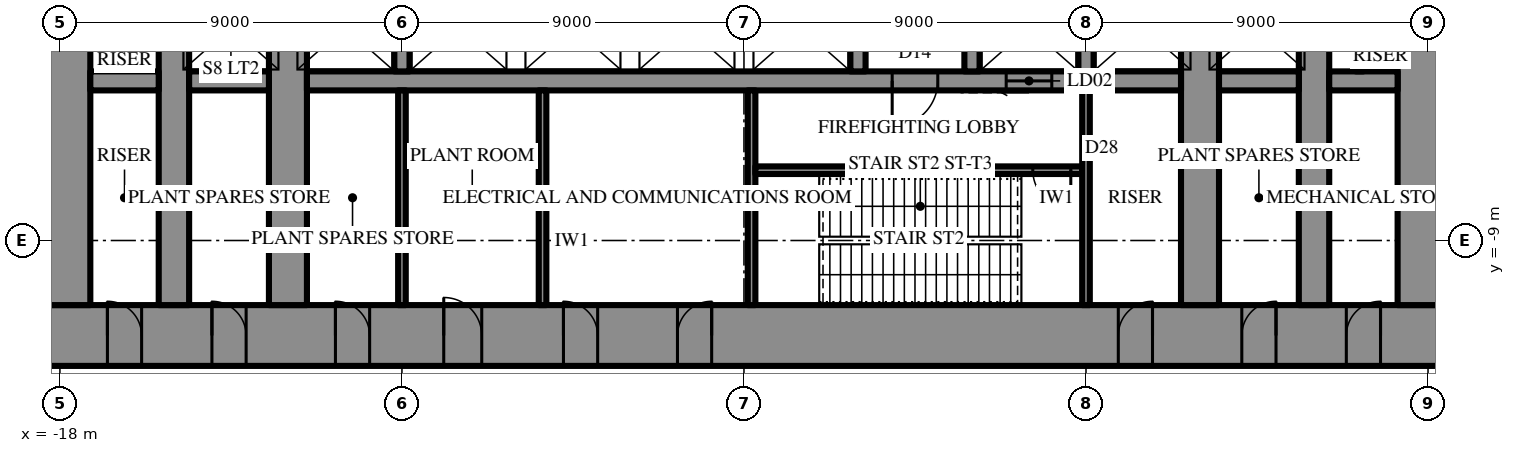
"""IFC4 building model, lengths in metres.
Left out: names, types, materials, properties, quantities, classifications, styles, units other than length and angle.
Written with IfcOpenShell. Run it as: python <this file> out.ifc"""

import sys

from ifc_helpers import new_model, si_unit, direction, frame, frame_2d, origin, place, context, subcontext, project, spatial, rectangle, extrude, element, fill, save


model = new_model("IFC4")
c1 = context("Model", 3, precision=1e-05, world=origin(), true_north=direction((0.0, 1.0)))
c2 = subcontext(c1, "Body", "Model", "MODEL_VIEW")
j1 = project(units=[si_unit("LENGTHUNIT", "METRE"), si_unit("PLANEANGLEUNIT", "RADIAN")], contexts=[c1])
p1 = place(None, origin())
s1 = spatial("IfcSite", under=j1, at=p1, CompositionType="ELEMENT")
p2 = place(p1, origin())
s2 = spatial("IfcBuilding", under=s1, at=p2, CompositionType="ELEMENT")
p3 = place(p2, frame((0.0, 0.0, 203.5)))
s3 = spatial("IfcBuildingStorey", under=s2, at=p3, CompositionType="ELEMENT", Elevation=203.5)
p4 = place(p3, frame((18.6, -11.5, 0.0), z_axis=(0.0, 0.0, 1.0), x_axis=(-1.0, 0.0, 0.0)))
e1 = element("IfcWall", 1, at=p4, inside=s3, PredefinedType="SHEAR", context=c2, shape_type="SweptSolid", body=[
    extrude(rectangle(XDim=37.2, YDim=1.6, at=frame_2d((18.6, 0.0))), origin(), (0.0, 0.0, 1.0), 7.0),
])
p5 = place(p4, frame((19.45, 0.0, 0.0)))
e2 = element("IfcOpeningElement", 2, at=p5, cuts=e1, PredefinedType="OPENING", context=c2, shape_type="SweptSolid", body=[
    extrude(rectangle(XDim=0.9, YDim=2.2, at=frame_2d((0.45, 1.1))), frame((0.0, 0.81, 0.0), z_axis=(0.0, -1.0, 0.0), x_axis=(1.0, 0.0, 0.0)), (0.0, 0.0, 1.0), 1.62),
])
p6 = place(p4, frame((22.45, 0.0, 0.0)))
e3 = element("IfcOpeningElement", 3, at=p6, cuts=e1, PredefinedType="OPENING", context=c2, shape_type="SweptSolid", body=[
    extrude(rectangle(XDim=0.9, YDim=2.2, at=frame_2d((0.45, 1.1))), frame((0.0, 0.81, 0.0), z_axis=(0.0, -1.0, 0.0), x_axis=(1.0, 0.0, 0.0)), (0.0, 0.0, 1.0), 1.62),
])
p7 = place(p4, frame((25.5, 0.0, 0.0)))
e4 = element("IfcOpeningElement", 4, at=p7, cuts=e1, PredefinedType="OPENING", context=c2, shape_type="SweptSolid", body=[
    extrude(rectangle(XDim=1.0, YDim=2.2, at=frame_2d((0.5, 1.1))), frame((0.0, 0.81, 0.0), z_axis=(0.0, -1.0, 0.0), x_axis=(1.0, 0.0, 0.0)), (0.0, 0.0, 1.0), 1.62),
])
p8 = place(p4, frame((1.85, 0.0, 0.0)))
e5 = element("IfcOpeningElement", 5, at=p8, cuts=e1, PredefinedType="OPENING", context=c2, shape_type="SweptSolid", body=[
    extrude(rectangle(XDim=0.9, YDim=2.2, at=frame_2d((0.45, 1.1))), frame((0.0, 0.81, 0.0), z_axis=(0.0, -1.0, 0.0), x_axis=(1.0, 0.0, 0.0)), (0.0, 0.0, 1.0), 1.62),
])
p9 = place(p4, frame((4.6, 0.0, 0.0)))
e6 = element("IfcOpeningElement", 6, at=p9, cuts=e1, PredefinedType="OPENING", context=c2, shape_type="SweptSolid", body=[
    extrude(rectangle(XDim=0.9, YDim=2.2, at=frame_2d((0.45, 1.1))), frame((0.0, 0.81, 0.0), z_axis=(0.0, -1.0, 0.0), x_axis=(1.0, 0.0, 0.0)), (0.0, 0.0, 1.0), 1.62),
])
p10 = place(p4, frame((7.85, 0.0, 0.0)))
e7 = element("IfcOpeningElement", 7, at=p10, cuts=e1, PredefinedType="OPENING", context=c2, shape_type="SweptSolid", body=[
    extrude(rectangle(XDim=0.9, YDim=2.2, at=frame_2d((0.45, 1.1))), frame((0.0, 0.81, 0.0), z_axis=(0.0, -1.0, 0.0), x_axis=(1.0, 0.0, 0.0)), (0.0, 0.0, 1.0), 1.62),
])
p11 = place(p4, frame((28.45, 0.0, 0.0)))
e8 = element("IfcOpeningElement", 8, at=p11, cuts=e1, PredefinedType="OPENING", context=c2, shape_type="SweptSolid", body=[
    extrude(rectangle(XDim=0.9, YDim=2.2, at=frame_2d((0.45, 1.1))), frame((0.0, 0.81, 0.0), z_axis=(0.0, -1.0, 0.0), x_axis=(1.0, 0.0, 0.0)), (0.0, 0.0, 1.0), 1.62),
])
p12 = place(p4, frame((31.7, 0.0, 0.0)))
e9 = element("IfcOpeningElement", 9, at=p12, cuts=e1, PredefinedType="OPENING", context=c2, shape_type="SweptSolid", body=[
    extrude(rectangle(XDim=0.9, YDim=2.2, at=frame_2d((0.45, 1.1))), frame((0.0, 0.81, 0.0), z_axis=(0.0, -1.0, 0.0), x_axis=(1.0, 0.0, 0.0)), (0.0, 0.0, 1.0), 1.62),
])
p13 = place(p4, frame((34.45, 0.0, 0.0)))
e10 = element("IfcOpeningElement", 10, at=p13, cuts=e1, PredefinedType="OPENING", context=c2, shape_type="SweptSolid", body=[
    extrude(rectangle(XDim=0.9, YDim=2.2, at=frame_2d((0.45, 1.1))), frame((0.0, 0.81, 0.0), z_axis=(0.0, -1.0, 0.0), x_axis=(1.0, 0.0, 0.0)), (0.0, 0.0, 1.0), 1.62),
])
p14 = place(p3, frame((17.9, -10.7, 0.0), z_axis=(0.0, 0.0, 1.0), x_axis=(0.0, 1.0, 0.0)))
e11 = element("IfcWall", 11, at=p14, inside=s3, PredefinedType="SHEAR", context=c2, shape_type="SweptSolid", body=[
    extrude(rectangle(XDim=21.4, YDim=1.4, at=frame_2d((10.7, 0.0))), origin(), (0.0, 0.0, 1.0), 7.0),
])
p15 = place(p14, frame((9.8, 0.0, 0.0)))
e12 = element("IfcOpeningElement", 12, at=p15, cuts=e11, PredefinedType="OPENING", context=c2, shape_type="SweptSolid", body=[
    extrude(rectangle(XDim=1.8, YDim=2.4, at=frame_2d((0.9, 1.2))), frame((0.0, 0.71, 0.0), z_axis=(0.0, -1.0, 0.0), x_axis=(1.0, 0.0, 0.0)), (0.0, 0.0, 1.0), 1.42),
])
p16 = place(p3, frame((-17.9, 10.7, 0.0), z_axis=(0.0, 0.0, 1.0), x_axis=(0.0, -1.0, 0.0)))
e13 = element("IfcWall", 13, at=p16, inside=s3, PredefinedType="SHEAR", context=c2, shape_type="SweptSolid", body=[
    extrude(rectangle(XDim=21.4, YDim=1.4, at=frame_2d((10.7, 0.0))), origin(), (0.0, 0.0, 1.0), 7.0),
])
p17 = place(p16, frame((9.8, 0.0, 0.0)))
e14 = element("IfcOpeningElement", 14, at=p17, cuts=e13, PredefinedType="OPENING", context=c2, shape_type="SweptSolid", body=[
    extrude(rectangle(XDim=1.8, YDim=2.4, at=frame_2d((0.9, 1.2))), frame((0.0, 0.71, 0.0), z_axis=(0.0, -1.0, 0.0), x_axis=(1.0, 0.0, 0.0)), (0.0, 0.0, 1.0), 1.42),
])
p18 = place(p3, frame((12.0, -10.7, 0.0), z_axis=(0.0, 0.0, 1.0), x_axis=(0.0, 1.0, 0.0)))
e15 = element("IfcWall", 15, at=p18, inside=s3, PredefinedType="SHEAR", context=c2, shape_type="SweptSolid", body=[
    extrude(rectangle(XDim=21.4, YDim=1.0, at=frame_2d((10.7, 0.0))), origin(), (0.0, 0.0, 1.0), 7.0),
])
p19 = place(p18, frame((9.8, 0.0, 0.0)))
e16 = element("IfcOpeningElement", 16, at=p19, cuts=e15, PredefinedType="OPENING", context=c2, shape_type="SweptSolid", body=[
    extrude(rectangle(XDim=1.8, YDim=2.4, at=frame_2d((0.9, 1.2))), frame((0.0, 0.51, 0.0), z_axis=(0.0, -1.0, 0.0), x_axis=(1.0, 0.0, 0.0)), (0.0, 0.0, 1.0), 1.02),
])
p20 = place(p3, frame((-12.0, -10.7, 0.0), z_axis=(0.0, 0.0, 1.0), x_axis=(0.0, 1.0, 0.0)))
e17 = element("IfcWall", 17, at=p20, inside=s3, PredefinedType="SHEAR", context=c2, shape_type="SweptSolid", body=[
    extrude(rectangle(XDim=21.4, YDim=1.0, at=frame_2d((10.7, 0.0))), origin(), (0.0, 0.0, 1.0), 7.0),
])
p21 = place(p20, frame((9.8, 0.0, 0.0)))
e18 = element("IfcOpeningElement", 18, at=p21, cuts=e17, PredefinedType="OPENING", context=c2, shape_type="SweptSolid", body=[
    extrude(rectangle(XDim=1.8, YDim=2.4, at=frame_2d((0.9, 1.2))), frame((0.0, 0.51, 0.0), z_axis=(0.0, -1.0, 0.0), x_axis=(1.0, 0.0, 0.0)), (0.0, 0.0, 1.0), 1.02),
])
p22 = place(p3, frame((15.0, -10.7, 0.0), z_axis=(0.0, 0.0, 1.0), x_axis=(0.0, 1.0, 0.0)))
e19 = element("IfcWall", 19, at=p22, inside=s3, PredefinedType="SHEAR", context=c2, shape_type="SweptSolid", body=[
    extrude(rectangle(XDim=21.4, YDim=0.8, at=frame_2d((10.7, 0.0))), origin(), (0.0, 0.0, 1.0), 7.0),
])
p23 = place(p22, frame((9.8, 0.0, 0.0)))
e20 = element("IfcOpeningElement", 20, at=p23, cuts=e19, PredefinedType="OPENING", context=c2, shape_type="SweptSolid", body=[
    extrude(rectangle(XDim=1.8, YDim=2.4, at=frame_2d((0.9, 1.2))), frame((0.0, 0.41, 0.0), z_axis=(0.0, -1.0, 0.0), x_axis=(1.0, 0.0, 0.0)), (0.0, 0.0, 1.0), 0.82),
])
p24 = place(p3, frame((-15.0, -10.7, 0.0), z_axis=(0.0, 0.0, 1.0), x_axis=(0.0, 1.0, 0.0)))
e21 = element("IfcWall", 21, at=p24, inside=s3, PredefinedType="SHEAR", context=c2, shape_type="SweptSolid", body=[
    extrude(rectangle(XDim=21.4, YDim=0.8, at=frame_2d((10.7, 0.0))), origin(), (0.0, 0.0, 1.0), 7.0),
])
p25 = place(p24, frame((9.8, 0.0, 0.0)))
e22 = element("IfcOpeningElement", 22, at=p25, cuts=e21, PredefinedType="OPENING", context=c2, shape_type="SweptSolid", body=[
    extrude(rectangle(XDim=1.8, YDim=2.4, at=frame_2d((0.9, 1.2))), frame((0.0, 0.41, 0.0), z_axis=(0.0, -1.0, 0.0), x_axis=(1.0, 0.0, 0.0)), (0.0, 0.0, 1.0), 0.82),
])
p26 = place(p3, frame((17.2, -4.8, 0.0), z_axis=(0.0, 0.0, 1.0), x_axis=(-1.0, 0.0, 0.0)))
e23 = element("IfcWall", 23, at=p26, inside=s3, PredefinedType="SHEAR", context=c2, shape_type="SweptSolid", body=[
    extrude(rectangle(XDim=1.8, YDim=0.5, at=frame_2d((0.9, 0.0))), origin(), (0.0, 0.0, 1.0), 7.0),
])
p27 = place(p3, frame((14.6, -4.8, 0.0), z_axis=(0.0, 0.0, 1.0), x_axis=(-1.0, 0.0, 0.0)))
e24 = element("IfcWall", 24, at=p27, inside=s3, PredefinedType="SHEAR", context=c2, shape_type="SweptSolid", body=[
    extrude(rectangle(XDim=2.1, YDim=0.5, at=frame_2d((1.05, 0.0))), origin(), (0.0, 0.0, 1.0), 7.0),
])
p28 = place(p3, frame((11.5, -4.8, 0.0), z_axis=(0.0, 0.0, 1.0), x_axis=(-1.0, 0.0, 0.0)))
e25 = element("IfcWall", 25, at=p28, inside=s3, PredefinedType="SHEAR", context=c2, shape_type="SweptSolid", body=[
    extrude(rectangle(XDim=23.0, YDim=0.5, at=frame_2d((11.5, 0.0))), origin(), (0.0, 0.0, 1.0), 7.0),
])
p29 = place(p28, frame((6.4, 0.0, 0.0)))
e26 = element("IfcOpeningElement", 26, at=p29, cuts=e25, PredefinedType="OPENING", context=c2, shape_type="SweptSolid", body=[
    extrude(rectangle(XDim=1.2, YDim=2.2, at=frame_2d((0.6, 1.1))), frame((0.0, 0.26, 0.0), z_axis=(0.0, -1.0, 0.0), x_axis=(1.0, 0.0, 0.0)), (0.0, 0.0, 1.0), 0.52),
])
p30 = place(p28, frame((3.4, 0.0, 0.0)))
e27 = element("IfcOpeningElement", 27, at=p30, cuts=e25, PredefinedType="OPENING", context=c2, shape_type="SweptSolid", body=[
    extrude(rectangle(XDim=1.2, YDim=2.2, at=frame_2d((0.6, 1.1))), frame((0.0, 0.26, 0.0), z_axis=(0.0, -1.0, 0.0), x_axis=(1.0, 0.0, 0.0)), (0.0, 0.0, 1.0), 0.52),
])
p31 = place(p3, frame((-12.5, -4.8, 0.0), z_axis=(0.0, 0.0, 1.0), x_axis=(-1.0, 0.0, 0.0)))
e28 = element("IfcWall", 28, at=p31, inside=s3, PredefinedType="SHEAR", context=c2, shape_type="SweptSolid", body=[
    extrude(rectangle(XDim=2.1, YDim=0.5, at=frame_2d((1.05, 0.0))), origin(), (0.0, 0.0, 1.0), 7.0),
])
p32 = place(p3, frame((-15.4, -4.8, 0.0), z_axis=(0.0, 0.0, 1.0), x_axis=(-1.0, 0.0, 0.0)))
e29 = element("IfcWall", 29, at=p32, inside=s3, PredefinedType="SHEAR", context=c2, shape_type="SweptSolid", body=[
    extrude(rectangle(XDim=1.8, YDim=0.5, at=frame_2d((0.9, 0.0))), origin(), (0.0, 0.0, 1.0), 7.0),
])
for number, where, z_axis, x_axis in (
    (30, (9.0, -2.25, 0.0), (0.0, 0.0, 1.0), (0.0, -1.0, 0.0)),
    (31, (6.0, -2.25, 0.0), (0.0, 0.0, 1.0), (0.0, -1.0, 0.0)),
    (32, (3.0, -2.25, 0.0), (0.0, 0.0, 1.0), (0.0, -1.0, 0.0)),
    (33, (-9.0, -2.25, 0.0), (0.0, 0.0, 1.0), (0.0, -1.0, 0.0)),
):
    element("IfcWall", number, at=place(p3, frame(where, z_axis=z_axis, x_axis=x_axis)), inside=s3, PredefinedType="SHEAR", context=c2, shape_type="SweptSolid", body=[
        extrude(rectangle(XDim=2.3, YDim=0.4, at=frame_2d((1.15, 0.0))), origin(), (0.0, 0.0, 1.0), 7.0),
    ])
p33 = place(p3, frame((0.2, -5.05, 0.0), z_axis=(0.0, 0.0, 1.0), x_axis=(0.0, -1.0, 0.0)))
e34 = element("IfcWall", 34, at=p33, inside=s3, PredefinedType="SHEAR", context=c2, shape_type="SweptSolid", body=[
    extrude(rectangle(XDim=5.65, YDim=0.2, at=frame_2d((2.825, 0.0))), origin(), (0.0, 0.0, 1.0), 7.0),
])
p34 = place(p3, frame((8.9, -7.15, 0.0), z_axis=(0.0, 0.0, 1.0), x_axis=(-1.0, 0.0, 0.0)))
e35 = element("IfcWall", 35, at=p34, inside=s3, PredefinedType="SHEAR", context=c2, shape_type="SweptSolid", body=[
    extrude(rectangle(XDim=8.6, YDim=0.2, at=frame_2d((4.3, 0.0))), origin(), (0.0, 0.0, 1.0), 7.0),
])
p35 = place(p34, frame((0.3, 0.0, 0.0)))
e36 = element("IfcOpeningElement", 36, at=p35, cuts=e35, PredefinedType="OPENING", context=c2, shape_type="SweptSolid", body=[
    extrude(rectangle(XDim=1.0, YDim=2.2, at=frame_2d((0.5, 1.1))), frame((0.0, 0.11, 0.0), z_axis=(0.0, -1.0, 0.0), x_axis=(1.0, 0.0, 0.0)), (0.0, 0.0, 1.0), 0.22),
])
for number, where, z_axis, x_axis in (
    (37, (9.0, -5.05, 0.0), (0.0, 0.0, 1.0), (0.0, -1.0, 0.0)),
    (38, (-9.0, -5.05, 0.0), (0.0, 0.0, 1.0), (0.0, -1.0, 0.0)),
    (39, (-5.3, -5.05, 0.0), (0.0, 0.0, 1.0), (0.0, -1.0, 0.0)),
):
    element("IfcWall", number, at=place(p3, frame(where, z_axis=z_axis, x_axis=x_axis)), inside=s3, PredefinedType="PARTITIONING", context=c2, shape_type="SweptSolid", body=[
        extrude(rectangle(XDim=5.65, YDim=0.2, at=frame_2d((2.825, 0.0))), origin(), (0.0, 0.0, 1.0), 6.7),
    ])
p36 = place(p3, frame((16.2, -3.55, 0.0), z_axis=(0.0, 0.0, 1.0), x_axis=(0.0, -1.0, 0.0)))
e40 = element("IfcWall", 40, at=p36, inside=s3, PredefinedType="PARTITIONING", context=c2, shape_type="SweptSolid", body=[
    extrude(rectangle(XDim=1.0, YDim=0.2, at=frame_2d((0.5, 0.0))), origin(), (0.0, 0.0, 1.0), 6.7),
])
p37 = place(p29, origin())
e41 = element("IfcDoor", 41, at=p37, inside=s3, OperationType="SINGLE_SWING_LEFT", PredefinedType="DOOR", context=c2, shape_type="SweptSolid", body=[
    extrude(rectangle(XDim=1.2, YDim=2.2, at=frame_2d((0.6, 1.1))), frame((0.0, 0.025, 0.0), z_axis=(0.0, -1.0, 0.0), x_axis=(1.0, 0.0, 0.0)), (0.0, 0.0, 1.0), 0.05),
])
fill(e26, e41)
p38 = place(p35, origin())
e42 = element("IfcDoor", 42, at=p38, inside=s3, OperationType="SINGLE_SWING_RIGHT", PredefinedType="DOOR", context=c2, shape_type="SweptSolid", body=[
    extrude(rectangle(XDim=1.0, YDim=2.2, at=frame_2d((0.5, 1.1))), frame((0.0, 0.025, 0.0), z_axis=(0.0, -1.0, 0.0), x_axis=(1.0, 0.0, 0.0)), (0.0, 0.0, 1.0), 0.05),
])
fill(e36, e42)
p39 = place(p5, frame((0.9, 0.0, 0.0), z_axis=(0.0, 0.0, 1.0), x_axis=(-1.0, 0.0, 0.0)))
e43 = element("IfcDoor", 43, at=p39, inside=s3, OperationType="SINGLE_SWING_LEFT", PredefinedType="DOOR", context=c2, shape_type="SweptSolid", body=[
    extrude(rectangle(XDim=0.9, YDim=2.2, at=frame_2d((0.45, 1.1))), frame((0.0, 0.025, 0.0), z_axis=(0.0, -1.0, 0.0), x_axis=(1.0, 0.0, 0.0)), (0.0, 0.0, 1.0), 0.05),
])
fill(e2, e43)
p40 = place(p6, frame((0.9, 0.0, 0.0), z_axis=(0.0, 0.0, 1.0), x_axis=(-1.0, 0.0, 0.0)))
e44 = element("IfcDoor", 44, at=p40, inside=s3, OperationType="SINGLE_SWING_RIGHT", PredefinedType="DOOR", context=c2, shape_type="SweptSolid", body=[
    extrude(rectangle(XDim=0.9, YDim=2.2, at=frame_2d((0.45, 1.1))), frame((0.0, 0.025, 0.0), z_axis=(0.0, -1.0, 0.0), x_axis=(1.0, 0.0, 0.0)), (0.0, 0.0, 1.0), 0.05),
])
fill(e3, e44)
p41 = place(p7, frame((1.0, 0.0, 0.0), z_axis=(0.0, 0.0, 1.0), x_axis=(-1.0, 0.0, 0.0)))
e45 = element("IfcDoor", 45, at=p41, inside=s3, OperationType="SINGLE_SWING_RIGHT", PredefinedType="DOOR", context=c2, shape_type="SweptSolid", body=[
    extrude(rectangle(XDim=1.0, YDim=2.2, at=frame_2d((0.5, 1.1))), frame((0.0, 0.025, 0.0), z_axis=(0.0, -1.0, 0.0), x_axis=(1.0, 0.0, 0.0)), (0.0, 0.0, 1.0), 0.05),
])
fill(e4, e45)
p42 = place(p8, frame((0.9, 0.0, 0.0), z_axis=(0.0, 0.0, 1.0), x_axis=(-1.0, 0.0, 0.0)))
e46 = element("IfcDoor", 46, at=p42, inside=s3, OperationType="SINGLE_SWING_LEFT", PredefinedType="DOOR", context=c2, shape_type="SweptSolid", body=[
    extrude(rectangle(XDim=0.9, YDim=2.2, at=frame_2d((0.45, 1.1))), frame((0.0, 0.025, 0.0), z_axis=(0.0, -1.0, 0.0), x_axis=(1.0, 0.0, 0.0)), (0.0, 0.0, 1.0), 0.05),
])
fill(e5, e46)
p43 = place(p9, frame((0.9, 0.0, 0.0), z_axis=(0.0, 0.0, 1.0), x_axis=(-1.0, 0.0, 0.0)))
e47 = element("IfcDoor", 47, at=p43, inside=s3, OperationType="SINGLE_SWING_LEFT", PredefinedType="DOOR", context=c2, shape_type="SweptSolid", body=[
    extrude(rectangle(XDim=0.9, YDim=2.2, at=frame_2d((0.45, 1.1))), frame((0.0, 0.025, 0.0), z_axis=(0.0, -1.0, 0.0), x_axis=(1.0, 0.0, 0.0)), (0.0, 0.0, 1.0), 0.05),
])
fill(e6, e47)
p44 = place(p10, frame((0.9, 0.0, 0.0), z_axis=(0.0, 0.0, 1.0), x_axis=(-1.0, 0.0, 0.0)))
e48 = element("IfcDoor", 48, at=p44, inside=s3, OperationType="SINGLE_SWING_LEFT", PredefinedType="DOOR", context=c2, shape_type="SweptSolid", body=[
    extrude(rectangle(XDim=0.9, YDim=2.2, at=frame_2d((0.45, 1.1))), frame((0.0, 0.025, 0.0), z_axis=(0.0, -1.0, 0.0), x_axis=(1.0, 0.0, 0.0)), (0.0, 0.0, 1.0), 0.05),
])
fill(e7, e48)
p45 = place(p11, frame((0.9, 0.0, 0.0), z_axis=(0.0, 0.0, 1.0), x_axis=(-1.0, 0.0, 0.0)))
e49 = element("IfcDoor", 49, at=p45, inside=s3, OperationType="SINGLE_SWING_RIGHT", PredefinedType="DOOR", context=c2, shape_type="SweptSolid", body=[
    extrude(rectangle(XDim=0.9, YDim=2.2, at=frame_2d((0.45, 1.1))), frame((0.0, 0.025, 0.0), z_axis=(0.0, -1.0, 0.0), x_axis=(1.0, 0.0, 0.0)), (0.0, 0.0, 1.0), 0.05),
])
fill(e8, e49)
p46 = place(p12, frame((0.9, 0.0, 0.0), z_axis=(0.0, 0.0, 1.0), x_axis=(-1.0, 0.0, 0.0)))
e50 = element("IfcDoor", 50, at=p46, inside=s3, OperationType="SINGLE_SWING_RIGHT", PredefinedType="DOOR", context=c2, shape_type="SweptSolid", body=[
    extrude(rectangle(XDim=0.9, YDim=2.2, at=frame_2d((0.45, 1.1))), frame((0.0, 0.025, 0.0), z_axis=(0.0, -1.0, 0.0), x_axis=(1.0, 0.0, 0.0)), (0.0, 0.0, 1.0), 0.05),
])
fill(e9, e50)
p47 = place(p13, frame((0.9, 0.0, 0.0), z_axis=(0.0, 0.0, 1.0), x_axis=(-1.0, 0.0, 0.0)))
e51 = element("IfcDoor", 51, at=p47, inside=s3, OperationType="SINGLE_SWING_RIGHT", PredefinedType="DOOR", context=c2, shape_type="SweptSolid", body=[
    extrude(rectangle(XDim=0.9, YDim=2.2, at=frame_2d((0.45, 1.1))), frame((0.0, 0.025, 0.0), z_axis=(0.0, -1.0, 0.0), x_axis=(1.0, 0.0, 0.0)), (0.0, 0.0, 1.0), 0.05),
])
fill(e10, e51)
p48 = place(p30, origin())
e52 = element("IfcDoor", 52, at=p48, inside=s3, OperationType="SLIDING_TO_LEFT", PredefinedType="DOOR", context=c2, shape_type="SweptSolid", body=[
    extrude(rectangle(XDim=1.2, YDim=2.2, at=frame_2d((0.6, 1.1))), frame((0.0, 0.025, 0.0), z_axis=(0.0, -1.0, 0.0), x_axis=(1.0, 0.0, 0.0)), (0.0, 0.0, 1.0), 0.05),
])
fill(e27, e52)
save(model, sys.argv[1])
